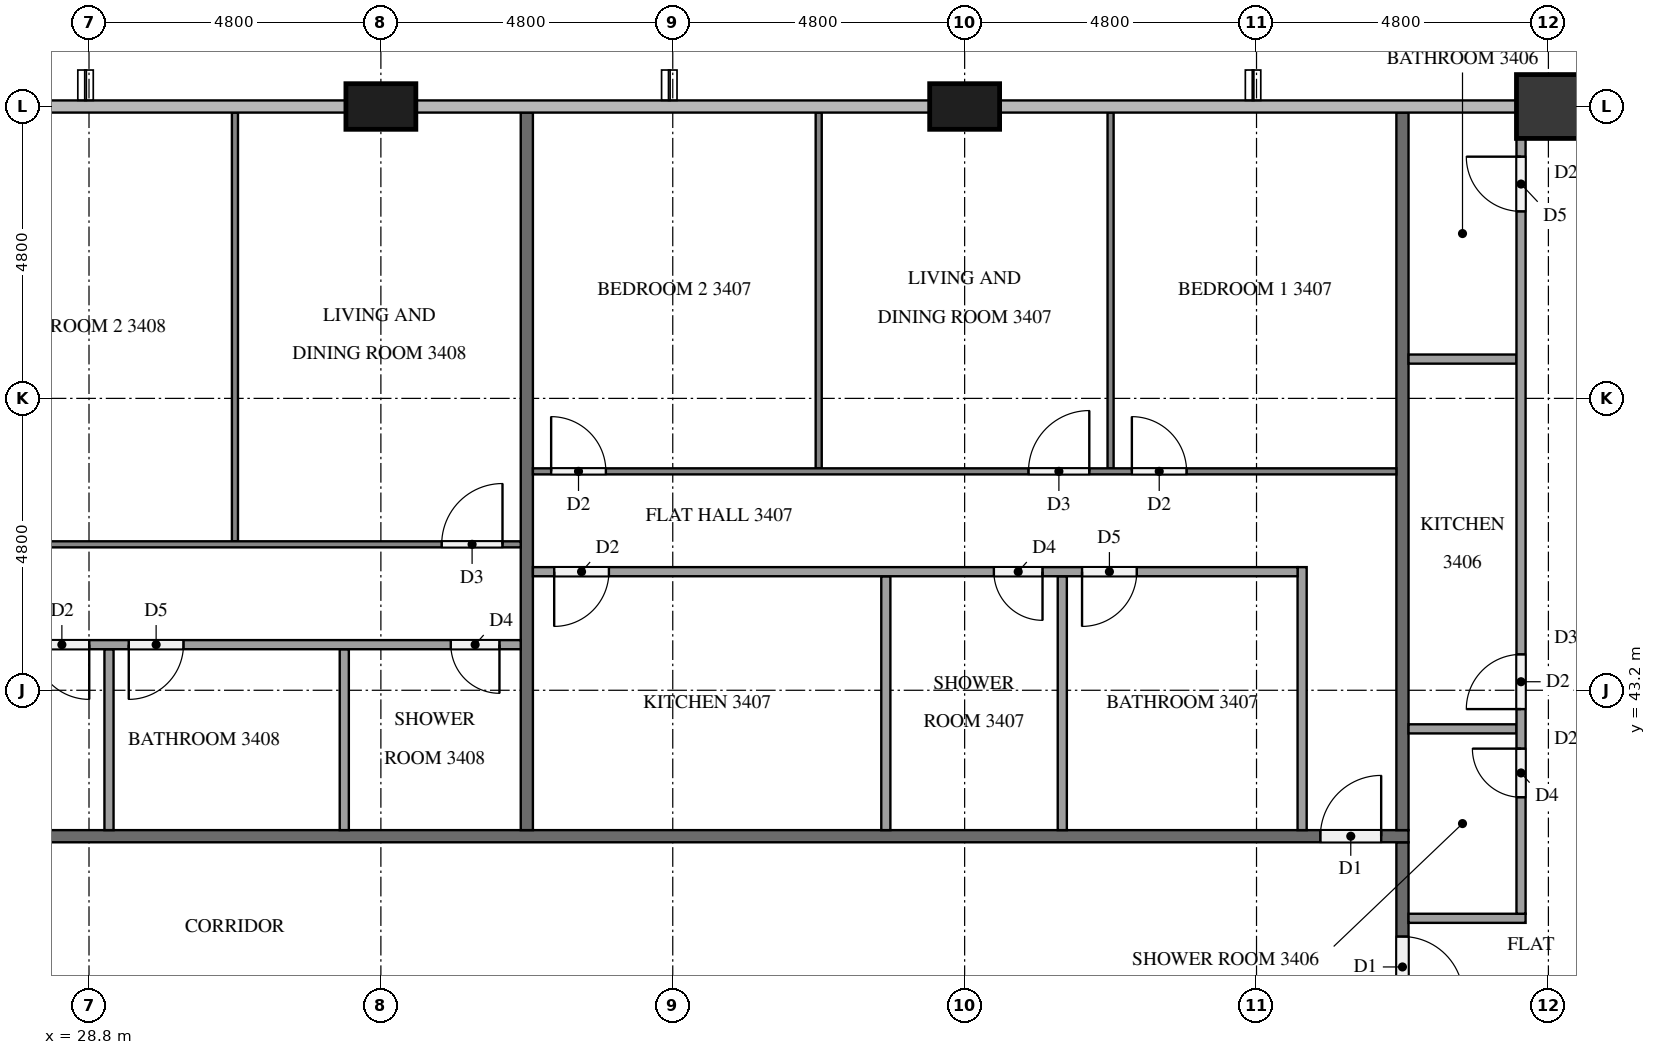
"""IFC4 building model, lengths in metres.
Left out: names, types, materials, properties, quantities, classifications, styles, units other than length and angle.
Written with IfcOpenShell. Run it as: python <this file> out.ifc"""

import sys

from ifc_helpers import new_model, si_unit, direction, frame, frame_2d, origin, origin_2d, place, context, subcontext, project, spatial, rectangle, extrude, element, fill, save


model = new_model("IFC4")
c1 = context("Model", 3, precision=1e-05, world=origin(), true_north=direction((0.0, 1.0)))
c2 = subcontext(c1, "Body", "Model", "MODEL_VIEW")
j1 = project(units=[si_unit("LENGTHUNIT", "METRE"), si_unit("PLANEANGLEUNIT", "RADIAN")], contexts=[c1])
p1 = place(None, origin())
s1 = spatial("IfcSite", under=j1, at=p1, CompositionType="ELEMENT")
p2 = place(p1, origin())
s2 = spatial("IfcBuilding", under=s1, at=p2, CompositionType="ELEMENT")
p3 = place(p2, frame((0.0, 0.0, 133.1)))
s3 = spatial("IfcBuildingStorey", under=s2, at=p3, CompositionType="ELEMENT", Elevation=133.1)
p4 = place(p3, frame((52.8, 52.8, 0.0), z_axis=(0.0, 0.0, 1.0), x_axis=(1.0, 0.0, 0.0)))
e1 = element("IfcColumn", 1, at=p4, inside=s3, PredefinedType="COLUMN", context=c2, shape_type="SweptSolid", body=[
    extrude(rectangle(XDim=1.05, YDim=1.05, at=origin_2d()), origin(), (0.0, 0.0, 1.0), 3.2),
])
for number, where, z_axis, x_axis in (
    (2, (43.2, 52.8, 0.0), (0.0, 0.0, 1.0), (1.0, 0.0, 0.0)),
    (3, (33.6, 52.8, 0.0), (0.0, 0.0, 1.0), (1.0, 0.0, 0.0)),
):
    element("IfcColumn", number, at=place(p3, frame(where, z_axis=z_axis, x_axis=x_axis)), inside=s3, PredefinedType="COLUMN", context=c2, shape_type="SweptSolid", body=[
        extrude(rectangle(XDim=1.15, YDim=0.75, at=origin_2d()), origin(), (0.0, 0.0, 1.0), 3.2),
    ])
p5 = place(p3, frame((50.4, 40.7, 0.0), z_axis=(0.0, 0.0, 1.0), x_axis=(0.0, -1.0, 0.0)))
e4 = element("IfcWall", 4, at=p5, inside=s3, PredefinedType="PARTITIONING", context=c2, shape_type="SweptSolid", body=[
    extrude(rectangle(XDim=2.8, YDim=0.2, at=frame_2d((1.4, 0.0))), origin(), (0.0, 0.0, 1.0), 3.2),
])
p6 = place(p5, frame((1.55, 0.0, 0.0)))
e5 = element("IfcOpeningElement", 5, at=p6, cuts=e4, PredefinedType="OPENING", context=c2, shape_type="SweptSolid", body=[
    extrude(rectangle(XDim=1.0, YDim=2.1, at=frame_2d((0.5, 1.05))), frame((0.0, 0.11, 0.0), z_axis=(0.0, -1.0, 0.0), x_axis=(1.0, 0.0, 0.0)), (0.0, 0.0, 1.0), 0.22),
])
p7 = place(p3, frame((11.9, 40.8, 0.0), z_axis=(0.0, 0.0, 1.0), x_axis=(1.0, 0.0, 0.0)))
e6 = element("IfcWall", 6, at=p7, inside=s3, PredefinedType="PARTITIONING", context=c2, shape_type="SweptSolid", body=[
    extrude(rectangle(XDim=38.6, YDim=0.2, at=frame_2d((19.3, 0.0))), origin(), (0.0, 0.0, 1.0), 3.2),
])
p8 = place(p7, frame((37.15, 0.0, 0.0)))
e7 = element("IfcOpeningElement", 7, at=p8, cuts=e6, PredefinedType="OPENING", context=c2, shape_type="SweptSolid", body=[
    extrude(rectangle(XDim=1.0, YDim=2.1, at=frame_2d((0.5, 1.05))), frame((0.0, 0.11, 0.0), z_axis=(0.0, -1.0, 0.0), x_axis=(1.0, 0.0, 0.0)), (0.0, 0.0, 1.0), 0.22),
])
p9 = place(p7, frame((10.05, 0.0, 0.0)))
e8 = element("IfcOpeningElement", 8, at=p9, cuts=e6, PredefinedType="OPENING", context=c2, shape_type="SweptSolid", body=[
    extrude(rectangle(XDim=1.0, YDim=2.1, at=frame_2d((0.5, 1.05))), frame((0.0, 0.11, 0.0), z_axis=(0.0, -1.0, 0.0), x_axis=(1.0, 0.0, 0.0)), (0.0, 0.0, 1.0), 0.22),
])
p10 = place(p7, frame((0.45, 0.0, 0.0)))
e9 = element("IfcOpeningElement", 9, at=p10, cuts=e6, PredefinedType="OPENING", context=c2, shape_type="SweptSolid", body=[
    extrude(rectangle(XDim=1.0, YDim=2.1, at=frame_2d((0.5, 1.05))), frame((0.0, 0.11, 0.0), z_axis=(0.0, -1.0, 0.0), x_axis=(1.0, 0.0, 0.0)), (0.0, 0.0, 1.0), 0.22),
])
for number, where, z_axis, x_axis in (
    (10, (50.4, 40.9, 0.0), (0.0, 0.0, 1.0), (0.0, 1.0, 0.0)),
    (11, (36.0, 52.7, 0.0), (0.0, 0.0, 1.0), (0.0, -1.0, 0.0)),
):
    element("IfcWall", number, at=place(p3, frame(where, z_axis=z_axis, x_axis=x_axis)), inside=s3, PredefinedType="PARTITIONING", context=c2, shape_type="SweptSolid", body=[
        extrude(rectangle(XDim=11.8, YDim=0.2, at=frame_2d((5.9, 0.0))), origin(), (0.0, 0.0, 1.0), 3.2),
    ])
for number, where, z_axis, x_axis in (
    (12, (50.5, 42.565, 0.0), (0.0, 0.0, 1.0), (1.0, 0.0, 0.0)),
    (13, (50.5, 48.646, 0.0), (0.0, 0.0, 1.0), (1.0, 0.0, 0.0)),
):
    element("IfcWall", number, at=place(p3, frame(where, z_axis=z_axis, x_axis=x_axis)), inside=s3, PredefinedType="PARTITIONING", context=c2, shape_type="SweptSolid", body=[
        extrude(rectangle(XDim=1.775, YDim=0.15, at=frame_2d((0.887, 0.0))), origin(), (0.0, 0.0, 1.0), 3.2),
    ])
p11 = place(p3, frame((50.5, 39.45, 0.0), z_axis=(0.0, 0.0, 1.0), x_axis=(1.0, 0.0, 0.0)))
e14 = element("IfcWall", 14, at=p11, inside=s3, PredefinedType="PARTITIONING", context=c2, shape_type="SweptSolid", body=[
    extrude(rectangle(XDim=1.925, YDim=0.15, at=frame_2d((0.962, 0.0))), origin(), (0.0, 0.0, 1.0), 3.2),
])
p12 = place(p3, frame((52.35, 39.525, 0.0), z_axis=(0.0, 0.0, 1.0), x_axis=(0.0, 1.0, 0.0)))
e15 = element("IfcWall", 15, at=p12, inside=s3, PredefinedType="PARTITIONING", context=c2, shape_type="SweptSolid", body=[
    extrude(rectangle(XDim=12.75, YDim=0.15, at=frame_2d((6.375, 0.0))), origin(), (0.0, 0.0, 1.0), 3.2),
])
p13 = place(p12, frame((1.915, 0.0, 0.0)))
e16 = element("IfcOpeningElement", 16, at=p13, cuts=e15, PredefinedType="OPENING", context=c2, shape_type="SweptSolid", body=[
    extrude(rectangle(XDim=0.8, YDim=2.1, at=frame_2d((0.4, 1.05))), frame((0.0, 0.085, 0.0), z_axis=(0.0, -1.0, 0.0), x_axis=(1.0, 0.0, 0.0)), (0.0, 0.0, 1.0), 0.17),
])
p14 = place(p12, frame((3.365, 0.0, 0.0)))
e17 = element("IfcOpeningElement", 17, at=p14, cuts=e15, PredefinedType="OPENING", context=c2, shape_type="SweptSolid", body=[
    extrude(rectangle(XDim=0.9, YDim=2.1, at=frame_2d((0.45, 1.05))), frame((0.0, 0.085, 0.0), z_axis=(0.0, -1.0, 0.0), x_axis=(1.0, 0.0, 0.0)), (0.0, 0.0, 1.0), 0.17),
])
p15 = place(p12, frame((11.55, 0.0, 0.0)))
e18 = element("IfcOpeningElement", 18, at=p15, cuts=e15, PredefinedType="OPENING", context=c2, shape_type="SweptSolid", body=[
    extrude(rectangle(XDim=0.9, YDim=2.1, at=frame_2d((0.45, 1.05))), frame((0.0, 0.085, 0.0), z_axis=(0.0, -1.0, 0.0), x_axis=(1.0, 0.0, 0.0)), (0.0, 0.0, 1.0), 0.17),
])
for number, where, z_axis, x_axis in (
    (19, (45.6, 46.85, 0.0), (0.0, 0.0, 1.0), (0.0, 1.0, 0.0)),
    (20, (40.8, 46.85, 0.0), (0.0, 0.0, 1.0), (0.0, 1.0, 0.0)),
):
    element("IfcWall", number, at=place(p3, frame(where, z_axis=z_axis, x_axis=x_axis)), inside=s3, PredefinedType="PARTITIONING", context=c2, shape_type="SweptSolid", body=[
        extrude(rectangle(XDim=5.85, YDim=0.1, at=frame_2d((2.925, 0.0))), origin(), (0.0, 0.0, 1.0), 3.2),
    ])
p16 = place(p3, frame((36.1, 46.8, 0.0), z_axis=(0.0, 0.0, 1.0), x_axis=(1.0, 0.0, 0.0)))
e21 = element("IfcWall", 21, at=p16, inside=s3, PredefinedType="PARTITIONING", context=c2, shape_type="SweptSolid", body=[
    extrude(rectangle(XDim=14.2, YDim=0.1, at=frame_2d((7.1, 0.0))), origin(), (0.0, 0.0, 1.0), 3.2),
])
p17 = place(p16, frame((9.85, 0.0, 0.0)))
e22 = element("IfcOpeningElement", 22, at=p17, cuts=e21, PredefinedType="OPENING", context=c2, shape_type="SweptSolid", body=[
    extrude(rectangle(XDim=0.9, YDim=2.1, at=frame_2d((0.45, 1.05))), frame((0.0, 0.06, 0.0), z_axis=(0.0, -1.0, 0.0), x_axis=(1.0, 0.0, 0.0)), (0.0, 0.0, 1.0), 0.12),
])
p18 = place(p16, frame((8.15, 0.0, 0.0)))
e23 = element("IfcOpeningElement", 23, at=p18, cuts=e21, PredefinedType="OPENING", context=c2, shape_type="SweptSolid", body=[
    extrude(rectangle(XDim=1.0, YDim=2.1, at=frame_2d((0.5, 1.05))), frame((0.0, 0.06, 0.0), z_axis=(0.0, -1.0, 0.0), x_axis=(1.0, 0.0, 0.0)), (0.0, 0.0, 1.0), 0.12),
])
p19 = place(p16, frame((0.3, 0.0, 0.0)))
e24 = element("IfcOpeningElement", 24, at=p19, cuts=e21, PredefinedType="OPENING", context=c2, shape_type="SweptSolid", body=[
    extrude(rectangle(XDim=0.9, YDim=2.1, at=frame_2d((0.45, 1.05))), frame((0.0, 0.06, 0.0), z_axis=(0.0, -1.0, 0.0), x_axis=(1.0, 0.0, 0.0)), (0.0, 0.0, 1.0), 0.12),
])
for number, where, z_axis, x_axis in (
    (25, (44.806, 40.9, 0.0), (0.0, 0.0, 1.0), (0.0, 1.0, 0.0)),
    (26, (41.904, 40.9, 0.0), (0.0, 0.0, 1.0), (0.0, 1.0, 0.0)),
):
    element("IfcWall", number, at=place(p3, frame(where, z_axis=z_axis, x_axis=x_axis)), inside=s3, PredefinedType="PARTITIONING", context=c2, shape_type="SweptSolid", body=[
        extrude(rectangle(XDim=4.175, YDim=0.15, at=frame_2d((2.087, 0.0))), origin(), (0.0, 0.0, 1.0), 3.2),
    ])
p20 = place(p3, frame((48.75, 40.9, 0.0), z_axis=(0.0, 0.0, 1.0), x_axis=(0.0, 1.0, 0.0)))
e27 = element("IfcWall", 27, at=p20, inside=s3, PredefinedType="PARTITIONING", context=c2, shape_type="SweptSolid", body=[
    extrude(rectangle(XDim=4.325, YDim=0.15, at=frame_2d((2.163, 0.0))), origin(), (0.0, 0.0, 1.0), 3.2),
])
p21 = place(p3, frame((48.675, 45.15, 0.0), z_axis=(0.0, 0.0, 1.0), x_axis=(-1.0, 0.0, 0.0)))
e28 = element("IfcWall", 28, at=p21, inside=s3, PredefinedType="PARTITIONING", context=c2, shape_type="SweptSolid", body=[
    extrude(rectangle(XDim=12.575, YDim=0.15, at=frame_2d((6.288, 0.0))), origin(), (0.0, 0.0, 1.0), 3.2),
])
p22 = place(p21, frame((2.644, 0.0, 0.0)))
e29 = element("IfcOpeningElement", 29, at=p22, cuts=e28, PredefinedType="OPENING", context=c2, shape_type="SweptSolid", body=[
    extrude(rectangle(XDim=0.9, YDim=2.1, at=frame_2d((0.45, 1.05))), frame((0.0, 0.085, 0.0), z_axis=(0.0, -1.0, 0.0), x_axis=(1.0, 0.0, 0.0)), (0.0, 0.0, 1.0), 0.17),
])
p23 = place(p21, frame((4.194, 0.0, 0.0)))
e30 = element("IfcOpeningElement", 30, at=p23, cuts=e28, PredefinedType="OPENING", context=c2, shape_type="SweptSolid", body=[
    extrude(rectangle(XDim=0.8, YDim=2.1, at=frame_2d((0.4, 1.05))), frame((0.0, 0.085, 0.0), z_axis=(0.0, -1.0, 0.0), x_axis=(1.0, 0.0, 0.0)), (0.0, 0.0, 1.0), 0.17),
])
p24 = place(p21, frame((11.325, 0.0, 0.0)))
e31 = element("IfcOpeningElement", 31, at=p24, cuts=e28, PredefinedType="OPENING", context=c2, shape_type="SweptSolid", body=[
    extrude(rectangle(XDim=0.9, YDim=2.1, at=frame_2d((0.45, 1.05))), frame((0.0, 0.085, 0.0), z_axis=(0.0, -1.0, 0.0), x_axis=(1.0, 0.0, 0.0)), (0.0, 0.0, 1.0), 0.17),
])
p25 = place(p3, frame((31.2, 45.65, 0.0), z_axis=(0.0, 0.0, 1.0), x_axis=(0.0, 1.0, 0.0)))
e32 = element("IfcWall", 32, at=p25, inside=s3, PredefinedType="PARTITIONING", context=c2, shape_type="SweptSolid", body=[
    extrude(rectangle(XDim=7.05, YDim=0.1, at=frame_2d((3.525, 0.0))), origin(), (0.0, 0.0, 1.0), 3.2),
])
p26 = place(p3, frame((21.7, 45.6, 0.0), z_axis=(0.0, 0.0, 1.0), x_axis=(1.0, 0.0, 0.0)))
e33 = element("IfcWall", 33, at=p26, inside=s3, PredefinedType="PARTITIONING", context=c2, shape_type="SweptSolid", body=[
    extrude(rectangle(XDim=14.2, YDim=0.1, at=frame_2d((7.1, 0.0))), origin(), (0.0, 0.0, 1.0), 3.2),
])
p27 = place(p26, frame((3.45, 0.0, 0.0)))
e34 = element("IfcOpeningElement", 34, at=p27, cuts=e33, PredefinedType="OPENING", context=c2, shape_type="SweptSolid", body=[
    extrude(rectangle(XDim=0.9, YDim=2.1, at=frame_2d((0.45, 1.05))), frame((0.0, 0.06, 0.0), z_axis=(0.0, -1.0, 0.0), x_axis=(1.0, 0.0, 0.0)), (0.0, 0.0, 1.0), 0.12),
])
p28 = place(p26, frame((5.05, 0.0, 0.0)))
e35 = element("IfcOpeningElement", 35, at=p28, cuts=e33, PredefinedType="OPENING", context=c2, shape_type="SweptSolid", body=[
    extrude(rectangle(XDim=0.9, YDim=2.1, at=frame_2d((0.45, 1.05))), frame((0.0, 0.06, 0.0), z_axis=(0.0, -1.0, 0.0), x_axis=(1.0, 0.0, 0.0)), (0.0, 0.0, 1.0), 0.12),
])
p29 = place(p26, frame((12.9, 0.0, 0.0)))
e36 = element("IfcOpeningElement", 36, at=p29, cuts=e33, PredefinedType="OPENING", context=c2, shape_type="SweptSolid", body=[
    extrude(rectangle(XDim=1.0, YDim=2.1, at=frame_2d((0.5, 1.05))), frame((0.0, 0.06, 0.0), z_axis=(0.0, -1.0, 0.0), x_axis=(1.0, 0.0, 0.0)), (0.0, 0.0, 1.0), 0.12),
])
for number, where, z_axis, x_axis in (
    (37, (29.129, 40.9, 0.0), (0.0, 0.0, 1.0), (0.0, 1.0, 0.0)),
    (38, (32.998, 40.9, 0.0), (0.0, 0.0, 1.0), (0.0, 1.0, 0.0)),
):
    element("IfcWall", number, at=place(p3, frame(where, z_axis=z_axis, x_axis=x_axis)), inside=s3, PredefinedType="PARTITIONING", context=c2, shape_type="SweptSolid", body=[
        extrude(rectangle(XDim=2.975, YDim=0.15, at=frame_2d((1.488, 0.0))), origin(), (0.0, 0.0, 1.0), 3.2),
    ])
p30 = place(p3, frame((35.9, 43.95, 0.0), z_axis=(0.0, 0.0, 1.0), x_axis=(-1.0, 0.0, 0.0)))
e39 = element("IfcWall", 39, at=p30, inside=s3, PredefinedType="PARTITIONING", context=c2, shape_type="SweptSolid", body=[
    extrude(rectangle(XDim=12.575, YDim=0.15, at=frame_2d((6.288, 0.0))), origin(), (0.0, 0.0, 1.0), 3.2),
])
p31 = place(p30, frame((7.096, 0.0, 0.0)))
e40 = element("IfcOpeningElement", 40, at=p31, cuts=e39, PredefinedType="OPENING", context=c2, shape_type="SweptSolid", body=[
    extrude(rectangle(XDim=0.9, YDim=2.1, at=frame_2d((0.45, 1.05))), frame((0.0, 0.085, 0.0), z_axis=(0.0, -1.0, 0.0), x_axis=(1.0, 0.0, 0.0)), (0.0, 0.0, 1.0), 0.17),
])
p32 = place(p30, frame((5.546, 0.0, 0.0)))
e41 = element("IfcOpeningElement", 41, at=p32, cuts=e39, PredefinedType="OPENING", context=c2, shape_type="SweptSolid", body=[
    extrude(rectangle(XDim=0.9, YDim=2.1, at=frame_2d((0.45, 1.05))), frame((0.0, 0.085, 0.0), z_axis=(0.0, -1.0, 0.0), x_axis=(1.0, 0.0, 0.0)), (0.0, 0.0, 1.0), 0.17),
])
p33 = place(p30, frame((0.35, 0.0, 0.0)))
e42 = element("IfcOpeningElement", 42, at=p33, cuts=e39, PredefinedType="OPENING", context=c2, shape_type="SweptSolid", body=[
    extrude(rectangle(XDim=0.8, YDim=2.1, at=frame_2d((0.4, 1.05))), frame((0.0, 0.085, 0.0), z_axis=(0.0, -1.0, 0.0), x_axis=(1.0, 0.0, 0.0)), (0.0, 0.0, 1.0), 0.17),
])
p34 = place(p6, origin())
e43 = element("IfcDoor", 43, at=p34, inside=s3, OperationType="SINGLE_SWING_RIGHT", PredefinedType="DOOR", context=c2, shape_type="SweptSolid", body=[
    extrude(rectangle(XDim=1.0, YDim=2.1, at=frame_2d((0.5, 1.05))), frame((0.0, 0.025, 0.0), z_axis=(0.0, -1.0, 0.0), x_axis=(1.0, 0.0, 0.0)), (0.0, 0.0, 1.0), 0.05),
])
fill(e5, e43)
p35 = place(p8, origin())
e44 = element("IfcDoor", 44, at=p35, inside=s3, OperationType="SINGLE_SWING_RIGHT", PredefinedType="DOOR", context=c2, shape_type="SweptSolid", body=[
    extrude(rectangle(XDim=1.0, YDim=2.1, at=frame_2d((0.5, 1.05))), frame((0.0, 0.025, 0.0), z_axis=(0.0, -1.0, 0.0), x_axis=(1.0, 0.0, 0.0)), (0.0, 0.0, 1.0), 0.05),
])
fill(e7, e44)
p36 = place(p13, origin())
e45 = element("IfcDoor", 45, at=p36, inside=s3, OperationType="SINGLE_SWING_RIGHT", PredefinedType="DOOR", context=c2, shape_type="SweptSolid", body=[
    extrude(rectangle(XDim=0.8, YDim=2.1, at=frame_2d((0.4, 1.05))), frame((0.0, 0.025, 0.0), z_axis=(0.0, -1.0, 0.0), x_axis=(1.0, 0.0, 0.0)), (0.0, 0.0, 1.0), 0.05),
])
fill(e16, e45)
p37 = place(p14, origin())
e46 = element("IfcDoor", 46, at=p37, inside=s3, OperationType="SINGLE_SWING_LEFT", PredefinedType="DOOR", context=c2, shape_type="SweptSolid", body=[
    extrude(rectangle(XDim=0.9, YDim=2.1, at=frame_2d((0.45, 1.05))), frame((0.0, 0.025, 0.0), z_axis=(0.0, -1.0, 0.0), x_axis=(1.0, 0.0, 0.0)), (0.0, 0.0, 1.0), 0.05),
])
fill(e17, e46)
p38 = place(p15, origin())
e47 = element("IfcDoor", 47, at=p38, inside=s3, OperationType="SINGLE_SWING_RIGHT", PredefinedType="DOOR", context=c2, shape_type="SweptSolid", body=[
    extrude(rectangle(XDim=0.9, YDim=2.1, at=frame_2d((0.45, 1.05))), frame((0.0, 0.025, 0.0), z_axis=(0.0, -1.0, 0.0), x_axis=(1.0, 0.0, 0.0)), (0.0, 0.0, 1.0), 0.05),
])
fill(e18, e47)
p39 = place(p17, origin())
e48 = element("IfcDoor", 48, at=p39, inside=s3, OperationType="SINGLE_SWING_LEFT", PredefinedType="DOOR", context=c2, shape_type="SweptSolid", body=[
    extrude(rectangle(XDim=0.9, YDim=2.1, at=frame_2d((0.45, 1.05))), frame((0.0, 0.025, 0.0), z_axis=(0.0, -1.0, 0.0), x_axis=(1.0, 0.0, 0.0)), (0.0, 0.0, 1.0), 0.05),
])
fill(e22, e48)
p40 = place(p18, origin())
e49 = element("IfcDoor", 49, at=p40, inside=s3, OperationType="SINGLE_SWING_RIGHT", PredefinedType="DOOR", context=c2, shape_type="SweptSolid", body=[
    extrude(rectangle(XDim=1.0, YDim=2.1, at=frame_2d((0.5, 1.05))), frame((0.0, 0.025, 0.0), z_axis=(0.0, -1.0, 0.0), x_axis=(1.0, 0.0, 0.0)), (0.0, 0.0, 1.0), 0.05),
])
fill(e23, e49)
p41 = place(p19, origin())
e50 = element("IfcDoor", 50, at=p41, inside=s3, OperationType="SINGLE_SWING_LEFT", PredefinedType="DOOR", context=c2, shape_type="SweptSolid", body=[
    extrude(rectangle(XDim=0.9, YDim=2.1, at=frame_2d((0.45, 1.05))), frame((0.0, 0.025, 0.0), z_axis=(0.0, -1.0, 0.0), x_axis=(1.0, 0.0, 0.0)), (0.0, 0.0, 1.0), 0.05),
])
fill(e24, e50)
p42 = place(p22, origin())
e51 = element("IfcDoor", 51, at=p42, inside=s3, OperationType="SINGLE_SWING_RIGHT", PredefinedType="DOOR", context=c2, shape_type="SweptSolid", body=[
    extrude(rectangle(XDim=0.9, YDim=2.1, at=frame_2d((0.45, 1.05))), frame((0.0, 0.025, 0.0), z_axis=(0.0, -1.0, 0.0), x_axis=(1.0, 0.0, 0.0)), (0.0, 0.0, 1.0), 0.05),
])
fill(e29, e51)
p43 = place(p23, origin())
e52 = element("IfcDoor", 52, at=p43, inside=s3, OperationType="SINGLE_SWING_LEFT", PredefinedType="DOOR", context=c2, shape_type="SweptSolid", body=[
    extrude(rectangle(XDim=0.8, YDim=2.1, at=frame_2d((0.4, 1.05))), frame((0.0, 0.025, 0.0), z_axis=(0.0, -1.0, 0.0), x_axis=(1.0, 0.0, 0.0)), (0.0, 0.0, 1.0), 0.05),
])
fill(e30, e52)
p44 = place(p24, origin())
e53 = element("IfcDoor", 53, at=p44, inside=s3, OperationType="SINGLE_SWING_RIGHT", PredefinedType="DOOR", context=c2, shape_type="SweptSolid", body=[
    extrude(rectangle(XDim=0.9, YDim=2.1, at=frame_2d((0.45, 1.05))), frame((0.0, 0.025, 0.0), z_axis=(0.0, -1.0, 0.0), x_axis=(1.0, 0.0, 0.0)), (0.0, 0.0, 1.0), 0.05),
])
fill(e31, e53)
p45 = place(p29, origin())
e54 = element("IfcDoor", 54, at=p45, inside=s3, OperationType="SINGLE_SWING_RIGHT", PredefinedType="DOOR", context=c2, shape_type="SweptSolid", body=[
    extrude(rectangle(XDim=1.0, YDim=2.1, at=frame_2d((0.5, 1.05))), frame((0.0, 0.025, 0.0), z_axis=(0.0, -1.0, 0.0), x_axis=(1.0, 0.0, 0.0)), (0.0, 0.0, 1.0), 0.05),
])
fill(e36, e54)
p46 = place(p31, origin())
e55 = element("IfcDoor", 55, at=p46, inside=s3, OperationType="SINGLE_SWING_LEFT", PredefinedType="DOOR", context=c2, shape_type="SweptSolid", body=[
    extrude(rectangle(XDim=0.9, YDim=2.1, at=frame_2d((0.45, 1.05))), frame((0.0, 0.025, 0.0), z_axis=(0.0, -1.0, 0.0), x_axis=(1.0, 0.0, 0.0)), (0.0, 0.0, 1.0), 0.05),
])
fill(e40, e55)
p47 = place(p32, origin())
e56 = element("IfcDoor", 56, at=p47, inside=s3, OperationType="SINGLE_SWING_RIGHT", PredefinedType="DOOR", context=c2, shape_type="SweptSolid", body=[
    extrude(rectangle(XDim=0.9, YDim=2.1, at=frame_2d((0.45, 1.05))), frame((0.0, 0.025, 0.0), z_axis=(0.0, -1.0, 0.0), x_axis=(1.0, 0.0, 0.0)), (0.0, 0.0, 1.0), 0.05),
])
fill(e41, e56)
p48 = place(p33, origin())
e57 = element("IfcDoor", 57, at=p48, inside=s3, OperationType="SINGLE_SWING_LEFT", PredefinedType="DOOR", context=c2, shape_type="SweptSolid", body=[
    extrude(rectangle(XDim=0.8, YDim=2.1, at=frame_2d((0.4, 1.05))), frame((0.0, 0.025, 0.0), z_axis=(0.0, -1.0, 0.0), x_axis=(1.0, 0.0, 0.0)), (0.0, 0.0, 1.0), 0.05),
])
fill(e42, e57)
save(model, sys.argv[1])
